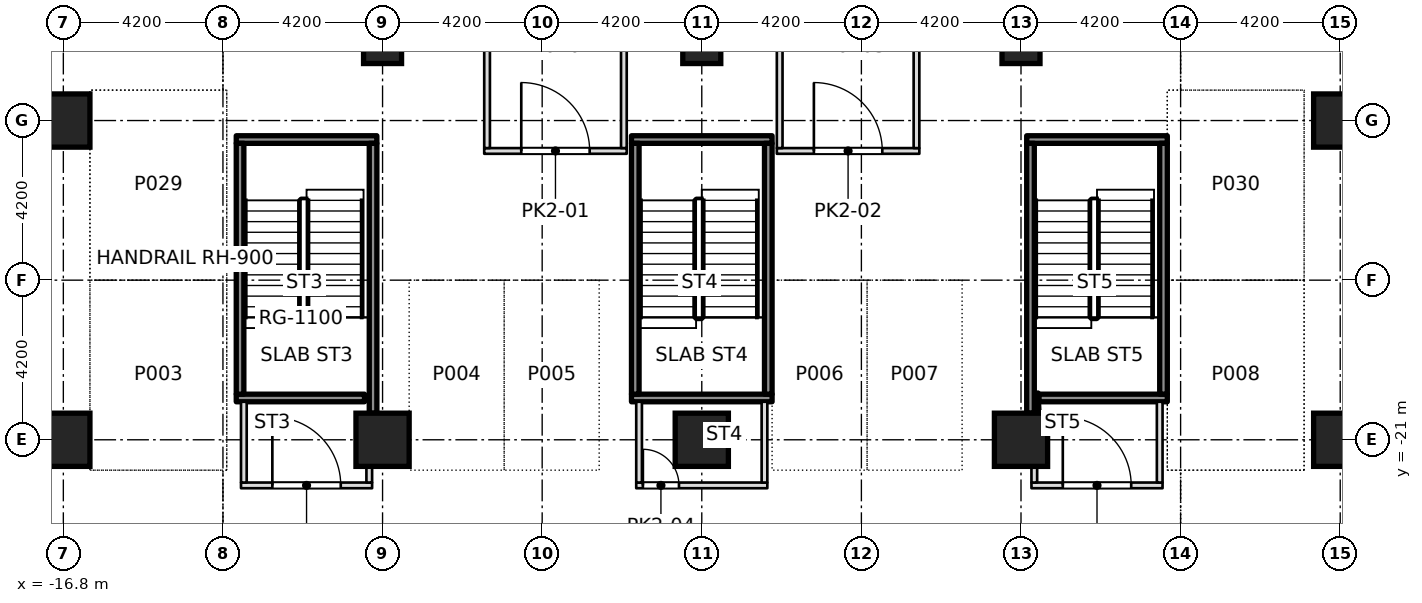
"""IFC4 building model, lengths in metres.
Left out: names, types, materials, properties, quantities, classifications, styles, units other than length and angle.
Written with IfcOpenShell. Run it as: python <this file> out.ifc"""

import sys

from ifc_helpers import new_model, si_unit, direction, frame, frame_2d, origin, origin_2d, place, context, subcontext, project, spatial, rectangle, extrude, element, fill, save


model = new_model("IFC4")
c1 = context("Model", 3, precision=1e-05, world=origin(), true_north=direction((0.0, 1.0)))
c2 = subcontext(c1, "Body", "Model", "MODEL_VIEW")
j1 = project(units=[si_unit("LENGTHUNIT", "METRE"), si_unit("PLANEANGLEUNIT", "RADIAN")], contexts=[c1])
p1 = place(None, origin())
s1 = spatial("IfcSite", under=j1, at=p1, CompositionType="ELEMENT")
p2 = place(p1, origin())
s2 = spatial("IfcBuilding", under=s1, at=p2, CompositionType="ELEMENT")
p3 = place(p2, frame((0.0, 0.0, -8.4)))
s3 = spatial("IfcBuildingStorey", under=s2, at=p3, CompositionType="ELEMENT", Elevation=-8.4)
for number, where, z_axis, x_axis in (
    (1, (-16.8, -21.0, 0.0), (0.0, 0.0, 1.0), (1.0, 0.0, 0.0)),
    (2, (-8.4, -21.0, 0.0), (0.0, 0.0, 1.0), (1.0, 0.0, 0.0)),
    (3, (0.0, -21.0, 0.0), (0.0, 0.0, 1.0), (1.0, 0.0, 0.0)),
    (4, (8.4, -21.0, 0.0), (0.0, 0.0, 1.0), (1.0, 0.0, 0.0)),
    (5, (16.8, -21.0, 0.0), (0.0, 0.0, 1.0), (1.0, 0.0, 0.0)),
    (6, (-16.8, -12.6, 0.0), (0.0, 0.0, 1.0), (1.0, 0.0, 0.0)),
    (7, (16.8, -12.6, 0.0), (0.0, 0.0, 1.0), (1.0, 0.0, 0.0)),
):
    element("IfcColumn", number, at=place(p3, frame(where, z_axis=z_axis, x_axis=x_axis)), inside=s3, PredefinedType="COLUMN", context=c2, shape_type="SweptSolid", body=[
        extrude(rectangle(XDim=1.4, YDim=1.4, at=origin_2d()), origin(), (0.0, 0.0, 1.0), 3.85),
    ])
for number, where, z_axis, x_axis in (
    (8, (-8.4, -10.6, 0.0), (0.0, 0.0, 1.0), (1.0, 0.0, 0.0)),
    (9, (0.0, -10.6, 0.0), (0.0, 0.0, 1.0), (1.0, 0.0, 0.0)),
    (10, (8.4, -10.6, 0.0), (0.0, 0.0, 1.0), (1.0, 0.0, 0.0)),
):
    element("IfcColumn", number, at=place(p3, frame(where, z_axis=z_axis, x_axis=x_axis)), inside=s3, PredefinedType="COLUMN", context=c2, shape_type="SweptSolid", body=[
        extrude(rectangle(XDim=1.0, YDim=1.0, at=origin_2d()), origin(), (0.0, 0.0, 1.0), 3.85),
    ])
p4 = place(p3, frame((-12.125, -22.2, 0.0), z_axis=(0.0, 0.0, 1.0), x_axis=(1.0, 0.0, 0.0)))
e11 = element("IfcWall", 11, at=p4, inside=s3, PredefinedType="PARTITIONING", context=c2, shape_type="SweptSolid", body=[
    extrude(rectangle(XDim=3.45, YDim=0.15, at=frame_2d((1.725, 0.0))), origin(), (0.0, 0.0, 1.0), 3.85),
])
p5 = place(p4, frame((0.825, 0.0, 0.0)))
e12 = element("IfcOpeningElement", 12, at=p5, cuts=e11, PredefinedType="OPENING", context=c2, shape_type="SweptSolid", body=[
    extrude(rectangle(XDim=1.8, YDim=2.1, at=frame_2d((0.9, 1.05))), frame((0.0, 0.085, 0.0), z_axis=(0.0, -1.0, 0.0), x_axis=(1.0, 0.0, 0.0)), (0.0, 0.0, 1.0), 0.17),
])
p6 = place(p3, frame((-1.725, -22.2, 0.0), z_axis=(0.0, 0.0, 1.0), x_axis=(1.0, 0.0, 0.0)))
e13 = element("IfcWall", 13, at=p6, inside=s3, PredefinedType="PARTITIONING", context=c2, shape_type="SweptSolid", body=[
    extrude(rectangle(XDim=3.45, YDim=0.15, at=frame_2d((1.725, 0.0))), origin(), (0.0, 0.0, 1.0), 3.85),
])
p7 = place(p6, frame((0.175, 0.0, 0.0)))
e14 = element("IfcOpeningElement", 14, at=p7, cuts=e13, PredefinedType="OPENING", context=c2, shape_type="SweptSolid", body=[
    extrude(rectangle(XDim=0.95, YDim=2.1, at=frame_2d((0.475, 1.05))), frame((0.0, 0.085, 0.0), z_axis=(0.0, -1.0, 0.0), x_axis=(1.0, 0.0, 0.0)), (0.0, 0.0, 1.0), 0.17),
])
p8 = place(p3, frame((8.675, -22.2, 0.0), z_axis=(0.0, 0.0, 1.0), x_axis=(1.0, 0.0, 0.0)))
e15 = element("IfcWall", 15, at=p8, inside=s3, PredefinedType="PARTITIONING", context=c2, shape_type="SweptSolid", body=[
    extrude(rectangle(XDim=3.45, YDim=0.15, at=frame_2d((1.725, 0.0))), origin(), (0.0, 0.0, 1.0), 3.85),
])
p9 = place(p8, frame((0.825, 0.0, 0.0)))
e16 = element("IfcOpeningElement", 16, at=p9, cuts=e15, PredefinedType="OPENING", context=c2, shape_type="SweptSolid", body=[
    extrude(rectangle(XDim=1.8, YDim=2.1, at=frame_2d((0.9, 1.05))), frame((0.0, 0.085, 0.0), z_axis=(0.0, -1.0, 0.0), x_axis=(1.0, 0.0, 0.0)), (0.0, 0.0, 1.0), 0.17),
])
p10 = place(p3, frame((-5.725, -13.4, 0.0), z_axis=(0.0, 0.0, 1.0), x_axis=(1.0, 0.0, 0.0)))
e17 = element("IfcWall", 17, at=p10, inside=s3, PredefinedType="PARTITIONING", context=c2, shape_type="SweptSolid", body=[
    extrude(rectangle(XDim=3.75, YDim=0.15, at=frame_2d((1.875, 0.0))), origin(), (0.0, 0.0, 1.0), 3.85),
])
p11 = place(p10, frame((0.975, 0.0, 0.0)))
e18 = element("IfcOpeningElement", 18, at=p11, cuts=e17, PredefinedType="OPENING", context=c2, shape_type="SweptSolid", body=[
    extrude(rectangle(XDim=1.8, YDim=2.1, at=frame_2d((0.9, 1.05))), frame((0.0, 0.085, 0.0), z_axis=(0.0, -1.0, 0.0), x_axis=(1.0, 0.0, 0.0)), (0.0, 0.0, 1.0), 0.17),
])
p12 = place(p3, frame((1.975, -13.4, 0.0), z_axis=(0.0, 0.0, 1.0), x_axis=(1.0, 0.0, 0.0)))
e19 = element("IfcWall", 19, at=p12, inside=s3, PredefinedType="PARTITIONING", context=c2, shape_type="SweptSolid", body=[
    extrude(rectangle(XDim=3.75, YDim=0.15, at=frame_2d((1.875, 0.0))), origin(), (0.0, 0.0, 1.0), 3.85),
])
p13 = place(p12, frame((0.975, 0.0, 0.0)))
e20 = element("IfcOpeningElement", 20, at=p13, cuts=e19, PredefinedType="OPENING", context=c2, shape_type="SweptSolid", body=[
    extrude(rectangle(XDim=1.8, YDim=2.1, at=frame_2d((0.9, 1.05))), frame((0.0, 0.085, 0.0), z_axis=(0.0, -1.0, 0.0), x_axis=(1.0, 0.0, 0.0)), (0.0, 0.0, 1.0), 0.17),
])
p14 = place(p3, frame((-12.05, -22.125, 0.0), z_axis=(0.0, 0.0, 1.0), x_axis=(0.0, 1.0, 0.0)))
e21 = element("IfcWall", 21, at=p14, inside=s3, PredefinedType="PARTITIONING", context=c2, shape_type="SweptSolid", body=[
    extrude(rectangle(XDim=2.125, YDim=0.15, at=frame_2d((1.062, 0.0))), origin(), (0.0, 0.0, 1.0), 3.85),
])
p15 = place(p3, frame((-8.75, -22.125, 0.0), z_axis=(0.0, 0.0, 1.0), x_axis=(0.0, 1.0, 0.0)))
e22 = element("IfcWall", 22, at=p15, inside=s3, PredefinedType="PARTITIONING", context=c2, shape_type="SweptSolid", body=[
    extrude(rectangle(XDim=0.425, YDim=0.15, at=frame_2d((0.212, 0.0))), origin(), (0.0, 0.0, 1.0), 3.85),
])
for number, where, z_axis, x_axis in (
    (23, (-5.65, -13.325, 0.0), (0.0, 0.0, 1.0), (0.0, 1.0, 0.0)),
    (24, (-2.05, -13.325, 0.0), (0.0, 0.0, 1.0), (0.0, 1.0, 0.0)),
):
    element("IfcWall", number, at=place(p3, frame(where, z_axis=z_axis, x_axis=x_axis)), inside=s3, PredefinedType="PARTITIONING", context=c2, shape_type="SweptSolid", body=[
        extrude(rectangle(XDim=4.924, YDim=0.15, at=frame_2d((2.462, 0.0))), origin(), (0.0, 0.0, 1.0), 3.85),
    ])
for number, where, z_axis, x_axis in (
    (25, (-1.65, -22.125, 0.0), (0.0, 0.0, 1.0), (0.0, 1.0, 0.0)),
    (26, (1.65, -22.125, 0.0), (0.0, 0.0, 1.0), (0.0, 1.0, 0.0)),
):
    element("IfcWall", number, at=place(p3, frame(where, z_axis=z_axis, x_axis=x_axis)), inside=s3, PredefinedType="PARTITIONING", context=c2, shape_type="SweptSolid", body=[
        extrude(rectangle(XDim=2.125, YDim=0.15, at=frame_2d((1.062, 0.0))), origin(), (0.0, 0.0, 1.0), 3.85),
    ])
for number, where, z_axis, x_axis in (
    (27, (2.05, -13.325, 0.0), (0.0, 0.0, 1.0), (0.0, 1.0, 0.0)),
    (28, (5.65, -13.325, 0.0), (0.0, 0.0, 1.0), (0.0, 1.0, 0.0)),
):
    element("IfcWall", number, at=place(p3, frame(where, z_axis=z_axis, x_axis=x_axis)), inside=s3, PredefinedType="PARTITIONING", context=c2, shape_type="SweptSolid", body=[
        extrude(rectangle(XDim=4.924, YDim=0.15, at=frame_2d((2.462, 0.0))), origin(), (0.0, 0.0, 1.0), 3.85),
    ])
p16 = place(p3, frame((8.75, -22.125, 0.0), z_axis=(0.0, 0.0, 1.0), x_axis=(0.0, 1.0, 0.0)))
e29 = element("IfcWall", 29, at=p16, inside=s3, PredefinedType="PARTITIONING", context=c2, shape_type="SweptSolid", body=[
    extrude(rectangle(XDim=0.425, YDim=0.15, at=frame_2d((0.212, 0.0))), origin(), (0.0, 0.0, 1.0), 3.85),
])
p17 = place(p3, frame((8.775, -20.3, 0.0), z_axis=(0.0, 0.0, 1.0), x_axis=(-0.047388561008, 0.998876531052, 0.0)))
e30 = element("IfcWall", 30, at=p17, inside=s3, PredefinedType="SOLIDWALL", context=c2, shape_type="SweptSolid", body=[
    extrude(rectangle(XDim=0.525, YDim=0.2, at=frame_2d((0.263, 0.0))), origin(), (0.0, 0.0, 1.0), 3.85),
])
p18 = place(p3, frame((12.05, -22.125, 0.0), z_axis=(0.0, 0.0, 1.0), x_axis=(0.0, 1.0, 0.0)))
e31 = element("IfcWall", 31, at=p18, inside=s3, PredefinedType="PARTITIONING", context=c2, shape_type="SweptSolid", body=[
    extrude(rectangle(XDim=2.125, YDim=0.15, at=frame_2d((1.062, 0.0))), origin(), (0.0, 0.0, 1.0), 3.85),
])
p19 = place(p3, frame((-12.25, -19.9, 0.0), z_axis=(0.0, 0.0, 1.0), x_axis=(1.0, 0.0, 0.0)))
e32 = element("IfcWall", 32, at=p19, inside=s3, PredefinedType="SOLIDWALL", context=c2, shape_type="SweptSolid", body=[
    extrude(rectangle(XDim=3.375, YDim=0.2, at=frame_2d((1.688, 0.0))), origin(), (0.0, 0.0, 1.0), 3.85),
])
p20 = place(p3, frame((-12.25, -13.1, 0.0), z_axis=(0.0, 0.0, 1.0), x_axis=(1.0, 0.0, 0.0)))
e33 = element("IfcWall", 33, at=p20, inside=s3, PredefinedType="SOLIDWALL", context=c2, shape_type="SweptSolid", body=[
    extrude(rectangle(XDim=3.7, YDim=0.2, at=frame_2d((1.85, 0.0))), origin(), (0.0, 0.0, 1.0), 3.85),
])
p21 = place(p3, frame((-12.15, -19.8, 0.0), z_axis=(0.0, 0.0, 1.0), x_axis=(0.0, 1.0, 0.0)))
e34 = element("IfcWall", 34, at=p21, inside=s3, PredefinedType="SOLIDWALL", context=c2, shape_type="SweptSolid", body=[
    extrude(rectangle(XDim=6.6, YDim=0.2, at=frame_2d((3.3, 0.0))), origin(), (0.0, 0.0, 1.0), 3.85),
])
p22 = place(p3, frame((-8.65, -20.3, 0.0), z_axis=(0.0, 0.0, 1.0), x_axis=(0.0, 1.0, 0.0)))
e35 = element("IfcWall", 35, at=p22, inside=s3, PredefinedType="SOLIDWALL", context=c2, shape_type="SweptSolid", body=[
    extrude(rectangle(XDim=7.1, YDim=0.2, at=frame_2d((3.55, 0.0))), origin(), (0.0, 0.0, 1.0), 3.85),
])
for number, where, z_axis, x_axis in (
    (36, (-1.85, -19.9, 0.0), (0.0, 0.0, 1.0), (1.0, 0.0, 0.0)),
    (37, (-1.85, -13.1, 0.0), (0.0, 0.0, 1.0), (1.0, 0.0, 0.0)),
):
    element("IfcWall", number, at=place(p3, frame(where, z_axis=z_axis, x_axis=x_axis)), inside=s3, PredefinedType="SOLIDWALL", context=c2, shape_type="SweptSolid", body=[
        extrude(rectangle(XDim=3.7, YDim=0.2, at=frame_2d((1.85, 0.0))), origin(), (0.0, 0.0, 1.0), 3.85),
    ])
for number, where, z_axis, x_axis in (
    (38, (-1.75, -19.8, 0.0), (0.0, 0.0, 1.0), (0.0, 1.0, 0.0)),
    (39, (1.75, -19.8, 0.0), (0.0, 0.0, 1.0), (0.0, 1.0, 0.0)),
):
    element("IfcWall", number, at=place(p3, frame(where, z_axis=z_axis, x_axis=x_axis)), inside=s3, PredefinedType="SOLIDWALL", context=c2, shape_type="SweptSolid", body=[
        extrude(rectangle(XDim=6.6, YDim=0.2, at=frame_2d((3.3, 0.0))), origin(), (0.0, 0.0, 1.0), 3.85),
    ])
p23 = place(p3, frame((8.875, -19.9, 0.0), z_axis=(0.0, 0.0, 1.0), x_axis=(1.0, 0.0, 0.0)))
e40 = element("IfcWall", 40, at=p23, inside=s3, PredefinedType="SOLIDWALL", context=c2, shape_type="SweptSolid", body=[
    extrude(rectangle(XDim=3.375, YDim=0.2, at=frame_2d((1.688, 0.0))), origin(), (0.0, 0.0, 1.0), 3.85),
])
p24 = place(p3, frame((8.55, -13.1, 0.0), z_axis=(0.0, 0.0, 1.0), x_axis=(1.0, 0.0, 0.0)))
e41 = element("IfcWall", 41, at=p24, inside=s3, PredefinedType="SOLIDWALL", context=c2, shape_type="SweptSolid", body=[
    extrude(rectangle(XDim=3.7, YDim=0.2, at=frame_2d((1.85, 0.0))), origin(), (0.0, 0.0, 1.0), 3.85),
])
p25 = place(p3, frame((8.65, -20.3, 0.0), z_axis=(0.0, 0.0, 1.0), x_axis=(0.0, 1.0, 0.0)))
e42 = element("IfcWall", 42, at=p25, inside=s3, PredefinedType="SOLIDWALL", context=c2, shape_type="SweptSolid", body=[
    extrude(rectangle(XDim=7.1, YDim=0.2, at=frame_2d((3.55, 0.0))), origin(), (0.0, 0.0, 1.0), 3.85),
])
p26 = place(p3, frame((12.15, -19.8, 0.0), z_axis=(0.0, 0.0, 1.0), x_axis=(0.0, 1.0, 0.0)))
e43 = element("IfcWall", 43, at=p26, inside=s3, PredefinedType="SOLIDWALL", context=c2, shape_type="SweptSolid", body=[
    extrude(rectangle(XDim=6.6, YDim=0.2, at=frame_2d((3.3, 0.0))), origin(), (0.0, 0.0, 1.0), 3.85),
])
p27 = place(p11, origin())
e44 = element("IfcDoor", 44, at=p27, inside=s3, OperationType="DOUBLE_DOOR_SINGLE_SWING", PredefinedType="DOOR", context=c2, shape_type="SweptSolid", body=[
    extrude(rectangle(XDim=1.8, YDim=2.1, at=frame_2d((0.9, 1.05))), frame((0.0, 0.025, 0.0), z_axis=(0.0, -1.0, 0.0), x_axis=(1.0, 0.0, 0.0)), (0.0, 0.0, 1.0), 0.05),
])
fill(e18, e44)
p28 = place(p13, origin())
e45 = element("IfcDoor", 45, at=p28, inside=s3, OperationType="DOUBLE_DOOR_SINGLE_SWING", PredefinedType="DOOR", context=c2, shape_type="SweptSolid", body=[
    extrude(rectangle(XDim=1.8, YDim=2.1, at=frame_2d((0.9, 1.05))), frame((0.0, 0.025, 0.0), z_axis=(0.0, -1.0, 0.0), x_axis=(1.0, 0.0, 0.0)), (0.0, 0.0, 1.0), 0.05),
])
fill(e20, e45)
p29 = place(p5, origin())
e46 = element("IfcDoor", 46, at=p29, inside=s3, OperationType="DOUBLE_DOOR_SINGLE_SWING", PredefinedType="DOOR", context=c2, shape_type="SweptSolid", body=[
    extrude(rectangle(XDim=1.8, YDim=2.1, at=frame_2d((0.9, 1.05))), frame((0.0, 0.025, 0.0), z_axis=(0.0, -1.0, 0.0), x_axis=(1.0, 0.0, 0.0)), (0.0, 0.0, 1.0), 0.05),
])
fill(e12, e46)
p30 = place(p7, origin())
e47 = element("IfcDoor", 47, at=p30, inside=s3, OperationType="SINGLE_SWING_LEFT", PredefinedType="DOOR", context=c2, shape_type="SweptSolid", body=[
    extrude(rectangle(XDim=0.95, YDim=2.1, at=frame_2d((0.475, 1.05))), frame((0.0, 0.025, 0.0), z_axis=(0.0, -1.0, 0.0), x_axis=(1.0, 0.0, 0.0)), (0.0, 0.0, 1.0), 0.05),
])
fill(e14, e47)
p31 = place(p9, origin())
e48 = element("IfcDoor", 48, at=p31, inside=s3, OperationType="DOUBLE_DOOR_SINGLE_SWING", PredefinedType="DOOR", context=c2, shape_type="SweptSolid", body=[
    extrude(rectangle(XDim=1.8, YDim=2.1, at=frame_2d((0.9, 1.05))), frame((0.0, 0.025, 0.0), z_axis=(0.0, -1.0, 0.0), x_axis=(1.0, 0.0, 0.0)), (0.0, 0.0, 1.0), 0.05),
])
fill(e16, e48)
save(model, sys.argv[1])
